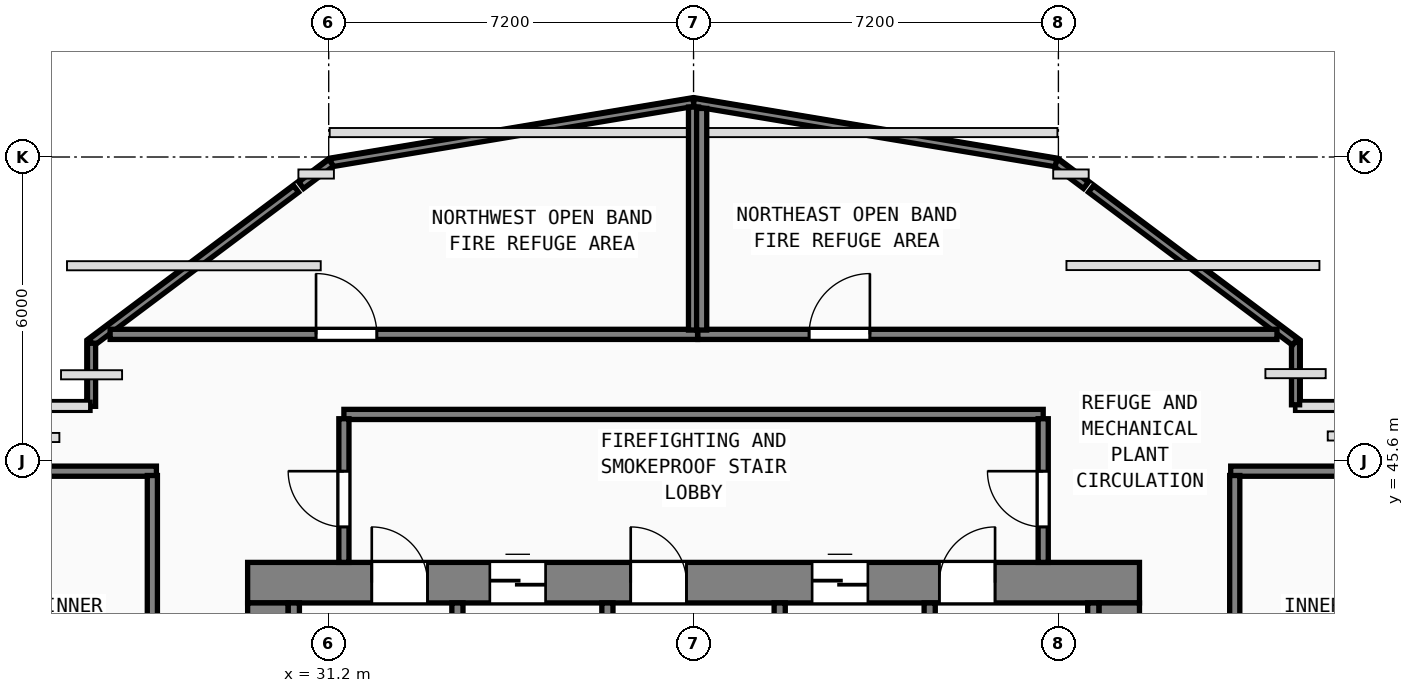
"""IFC4 building model, lengths in metres.
Left out: names, types, materials, properties, quantities, classifications, styles, units other than length and angle.
Written with IfcOpenShell. Run it as: python <this file> out.ifc"""

import sys

from ifc_helpers import new_model, si_unit, direction, frame, frame_2d, origin, origin_2d, place, context, subcontext, project, spatial, rectangle, hollow_rectangle, extrude, element, fill, save


model = new_model("IFC4")
c1 = context("Model", 3, precision=1e-05, world=origin(), true_north=direction((0.0, 1.0)))
c2 = subcontext(c1, "Body", "Model", "MODEL_VIEW")
j1 = project(units=[si_unit("LENGTHUNIT", "METRE"), si_unit("PLANEANGLEUNIT", "RADIAN")], contexts=[c1])
p1 = place(None, origin())
s1 = spatial("IfcSite", under=j1, at=p1, CompositionType="ELEMENT")
p2 = place(p1, origin())
s2 = spatial("IfcBuilding", under=s1, at=p2, CompositionType="ELEMENT")
p3 = place(p2, frame((0.0, 0.0, 43.0)))
s3 = spatial("IfcBuildingStorey", under=s2, at=p3, CompositionType="ELEMENT", Elevation=43.0)
p4 = place(p3, frame((29.6, 43.2, 0.0), z_axis=(0.0, 0.0, 1.0), x_axis=(1.0, 0.0, 0.0)))
e1 = element("IfcWall", 1, at=p4, inside=s3, PredefinedType="SHEAR", context=c2, shape_type="SweptSolid", body=[
    extrude(rectangle(XDim=17.6, YDim=0.8, at=frame_2d((8.8, 0.0))), origin(), (0.0, 0.0, 1.0), 4.4),
])
p5 = place(p4, frame((2.45, 0.0, 0.0)))
e2 = element("IfcOpeningElement", 2, at=p5, cuts=e1, PredefinedType="OPENING", context=c2, shape_type="SweptSolid", body=[
    extrude(rectangle(XDim=1.1, YDim=2.15, at=frame_2d((0.55, 1.075))), frame((0.0, 0.41, 0.0), z_axis=(0.0, -1.0, 0.0), x_axis=(1.0, 0.0, 0.0)), (0.0, 0.0, 1.0), 0.82),
])
p6 = place(p4, frame((7.56, 0.0, 0.0)))
e3 = element("IfcOpeningElement", 3, at=p6, cuts=e1, PredefinedType="OPENING", context=c2, shape_type="SweptSolid", body=[
    extrude(rectangle(XDim=1.1, YDim=2.15, at=frame_2d((0.55, 1.075))), frame((0.0, 0.41, 0.0), z_axis=(0.0, -1.0, 0.0), x_axis=(1.0, 0.0, 0.0)), (0.0, 0.0, 1.0), 0.82),
])
p7 = place(p4, frame((13.65, 0.0, 0.0)))
e4 = element("IfcOpeningElement", 4, at=p7, cuts=e1, PredefinedType="OPENING", context=c2, shape_type="SweptSolid", body=[
    extrude(rectangle(XDim=1.1, YDim=2.15, at=frame_2d((0.55, 1.075))), frame((0.0, 0.41, 0.0), z_axis=(0.0, -1.0, 0.0), x_axis=(1.0, 0.0, 0.0)), (0.0, 0.0, 1.0), 0.82),
])
p8 = place(p4, frame((4.78, 0.0, 0.0)))
e5 = element("IfcOpeningElement", 5, at=p8, cuts=e1, PredefinedType="OPENING", context=c2, shape_type="SweptSolid", body=[
    extrude(rectangle(XDim=1.1, YDim=2.2, at=frame_2d((0.55, 1.1))), frame((0.0, 0.41, 0.0), z_axis=(0.0, -1.0, 0.0), x_axis=(1.0, 0.0, 0.0)), (0.0, 0.0, 1.0), 0.82),
])
p9 = place(p4, frame((11.14, 0.0, 0.0)))
e6 = element("IfcOpeningElement", 6, at=p9, cuts=e1, PredefinedType="OPENING", context=c2, shape_type="SweptSolid", body=[
    extrude(rectangle(XDim=1.1, YDim=2.2, at=frame_2d((0.55, 1.1))), frame((0.0, 0.41, 0.0), z_axis=(0.0, -1.0, 0.0), x_axis=(1.0, 0.0, 0.0)), (0.0, 0.0, 1.0), 0.82),
])
for number, where, z_axis, x_axis in (
    (7, (30.0, 32.8, 0.0), (0.0, 0.0, 1.0), (0.0, 1.0, 0.0)),
    (8, (46.8, 32.8, 0.0), (0.0, 0.0, 1.0), (0.0, 1.0, 0.0)),
):
    element("IfcWall", number, at=place(p3, frame(where, z_axis=z_axis, x_axis=x_axis)), inside=s3, PredefinedType="SHEAR", context=c2, shape_type="SweptSolid", body=[
        extrude(rectangle(XDim=10.0, YDim=0.8, at=frame_2d((5.0, 0.0))), origin(), (0.0, 0.0, 1.0), 4.4),
    ])
for number, where, z_axis, x_axis in (
    (9, (30.512, 35.39, 0.0), (0.0, 0.0, 1.0), (0.0, 1.0, 0.0)),
    (10, (33.74, 35.39, 0.0), (0.0, 0.0, 1.0), (0.0, 1.0, 0.0)),
    (11, (36.7, 35.39, 0.0), (0.0, 0.0, 1.0), (0.0, 1.0, 0.0)),
    (12, (40.1, 35.39, 0.0), (0.0, 0.0, 1.0), (0.0, 1.0, 0.0)),
    (13, (43.06, 35.39, 0.0), (0.0, 0.0, 1.0), (0.0, 1.0, 0.0)),
    (14, (46.288, 35.39, 0.0), (0.0, 0.0, 1.0), (0.0, 1.0, 0.0)),
):
    element("IfcWall", number, at=place(p3, frame(where, z_axis=z_axis, x_axis=x_axis)), inside=s3, PredefinedType="SHEAR", context=c2, shape_type="SweptSolid", body=[
        extrude(rectangle(XDim=7.41, YDim=0.22, at=frame_2d((3.705, 0.0))), origin(), (0.0, 0.0, 1.0), 4.4),
    ])
for number, where, z_axis, x_axis in (
    (15, (31.2, 50.4, 0.0), (0.0, 0.0, 1.0), (1.0, 0.0, 0.0)),
    (16, (45.6, 50.4, 0.0), (0.0, 0.0, 1.0), (1.0, 0.0, 0.0)),
):
    element("IfcColumn", number, at=place(p3, frame(where, z_axis=z_axis, x_axis=x_axis)), inside=s3, PredefinedType="COLUMN", context=c2, shape_type="SweptSolid", body=[
        extrude(hollow_rectangle(XDim=1.3, YDim=1.3, WallThickness=0.048, at=origin_2d()), origin(), (0.0, 0.0, 1.0), 4.6),
    ])
p10 = place(p3, frame((38.4, 50.4, 0.0), z_axis=(0.0, 0.0, 1.0), x_axis=(1.0, 0.0, 0.0)))
e17 = element("IfcColumn", 17, at=p10, inside=s3, PredefinedType="COLUMN", context=c2, shape_type="SweptSolid", body=[
    extrude(hollow_rectangle(XDim=1.0, YDim=1.0, WallThickness=0.038, at=origin_2d()), origin(), (0.0, 0.0, 1.0), 4.6),
])
p11 = place(p3, frame((51.45, 46.68, 0.0), z_axis=(0.0, 0.0, 1.0), x_axis=(-1.0, 0.0, 0.0)))
e18 = element("IfcWall", 18, at=p11, inside=s3, PredefinedType="PARAPET", context=c2, shape_type="SweptSolid", body=[
    extrude(rectangle(XDim=1.17, YDim=0.16, at=frame_2d((0.585, 0.0))), origin(), (0.0, 0.0, 1.0), 1.15),
])
p12 = place(p3, frame((50.28, 46.71, 0.0), z_axis=(0.0, 0.0, 1.0), x_axis=(0.0, 1.0, 0.0)))
e19 = element("IfcWall", 19, at=p12, inside=s3, PredefinedType="PARAPET", context=c2, shape_type="SweptSolid", body=[
    extrude(rectangle(XDim=1.23, YDim=0.16, at=frame_2d((0.615, 0.0))), origin(), (0.0, 0.0, 1.0), 1.15),
])
p13 = place(p3, frame((50.268, 47.949, 0.0), z_axis=(0.0, 0.0, 1.0), x_axis=(-0.800005821362, 0.599992238106, 0.0)))
e20 = element("IfcWall", 20, at=p13, inside=s3, PredefinedType="PARAPET", context=c2, shape_type="SweptSolid", body=[
    extrude(rectangle(XDim=5.033, YDim=0.16, at=frame_2d((2.516, 0.0))), origin(), (0.0, 0.0, 1.0), 1.15),
])
p14 = place(p3, frame((46.144, 51.042, 0.0), z_axis=(0.0, 0.0, 1.0), x_axis=(-0.79992085825, 0.600105507838, 0.0)))
e21 = element("IfcWall", 21, at=p14, inside=s3, PredefinedType="PARAPET", context=c2, shape_type="SweptSolid", body=[
    extrude(rectangle(XDim=0.74, YDim=0.16, at=frame_2d((0.37, 0.0))), origin(), (0.0, 0.0, 1.0), 1.15),
])
p15 = place(p3, frame((45.552, 51.486, 0.0), z_axis=(0.0, 0.0, 1.0), x_axis=(-0.986394833909, 0.164393526752, 0.0)))
e22 = element("IfcWall", 22, at=p15, inside=s3, PredefinedType="PARAPET", context=c2, shape_type="SweptSolid", body=[
    extrude(rectangle(XDim=7.25, YDim=0.16, at=frame_2d((3.625, 0.0))), origin(), (0.0, 0.0, 1.0), 1.15),
])
p16 = place(p3, frame((38.4, 52.678, 0.0), z_axis=(0.0, 0.0, 1.0), x_axis=(-0.986393923832, -0.164398987305, 0.0)))
e23 = element("IfcWall", 23, at=p16, inside=s3, PredefinedType="PARAPET", context=c2, shape_type="SweptSolid", body=[
    extrude(rectangle(XDim=7.25, YDim=0.16, at=frame_2d((3.625, 0.0))), origin(), (0.0, 0.0, 1.0), 1.15),
])
p17 = place(p3, frame((31.249, 51.486, 0.0), z_axis=(0.0, 0.0, 1.0), x_axis=(-0.800039555223, -0.59994725608, 0.0)))
e24 = element("IfcWall", 24, at=p17, inside=s3, PredefinedType="PARAPET", context=c2, shape_type="SweptSolid", body=[
    extrude(rectangle(XDim=0.741, YDim=0.16, at=frame_2d((0.37, 0.0))), origin(), (0.0, 0.0, 1.0), 1.15),
])
p18 = place(p3, frame((30.558, 50.969, 0.0), z_axis=(0.0, 0.0, 1.0), x_axis=(-0.8, -0.6, 0.0)))
e25 = element("IfcWall", 25, at=p18, inside=s3, PredefinedType="PARAPET", context=c2, shape_type="SweptSolid", body=[
    extrude(rectangle(XDim=5.048, YDim=0.16, at=frame_2d((2.524, 0.0))), origin(), (0.0, 0.0, 1.0), 1.15),
])
p19 = place(p3, frame((26.52, 47.925, 0.0), z_axis=(0.0, 0.0, 1.0), x_axis=(0.0, -1.0, 0.0)))
e26 = element("IfcWall", 26, at=p19, inside=s3, PredefinedType="PARAPET", context=c2, shape_type="SweptSolid", body=[
    extrude(rectangle(XDim=1.245, YDim=0.16, at=frame_2d((0.623, 0.0))), origin(), (0.0, 0.0, 1.0), 1.15),
])
p20 = place(p3, frame((26.49, 46.68, 0.0), z_axis=(0.0, 0.0, 1.0), x_axis=(-1.0, 0.0, 0.0)))
e27 = element("IfcWall", 27, at=p20, inside=s3, PredefinedType="PARAPET", context=c2, shape_type="SweptSolid", body=[
    extrude(rectangle(XDim=1.17, YDim=0.16, at=frame_2d((0.585, 0.0))), origin(), (0.0, 0.0, 1.0), 1.15),
])
p21 = place(p3, frame((31.5, 46.52, 0.0), z_axis=(0.0, 0.0, 1.0), x_axis=(1.0, 0.0, 0.0)))
e28 = element("IfcWall", 28, at=p21, inside=s3, PredefinedType="SOLIDWALL", context=c2, shape_type="SweptSolid", body=[
    extrude(rectangle(XDim=13.8, YDim=0.2, at=frame_2d((6.9, 0.0))), origin(), (0.0, 0.0, 1.0), 4.4),
])
p22 = place(p3, frame((31.5, 43.6, 0.0), z_axis=(0.0, 0.0, 1.0), x_axis=(0.0, 1.0, 0.0)))
e29 = element("IfcWall", 29, at=p22, inside=s3, PredefinedType="SOLIDWALL", context=c2, shape_type="SweptSolid", body=[
    extrude(rectangle(XDim=2.835, YDim=0.2, at=frame_2d((1.417, 0.0))), origin(), (0.0, 0.0, 1.0), 4.4),
])
p23 = place(p22, frame((1.8, 0.0, 0.0), z_axis=(0.0, 0.0, 1.0), x_axis=(-1.0, 0.0, 0.0)))
e30 = element("IfcOpeningElement", 30, at=p23, cuts=e29, PredefinedType="OPENING", context=c2, shape_type="SweptSolid", body=[
    extrude(rectangle(XDim=1.1, YDim=2.15, at=frame_2d((0.55, 1.075))), frame((0.0, 0.11, 0.0), z_axis=(0.0, -1.0, 0.0), x_axis=(1.0, 0.0, 0.0)), (0.0, 0.0, 1.0), 0.22),
])
p24 = place(p3, frame((45.3, 43.6, 0.0), z_axis=(0.0, 0.0, 1.0), x_axis=(0.0, 1.0, 0.0)))
e31 = element("IfcWall", 31, at=p24, inside=s3, PredefinedType="SOLIDWALL", context=c2, shape_type="SweptSolid", body=[
    extrude(rectangle(XDim=2.835, YDim=0.2, at=frame_2d((1.417, 0.0))), origin(), (0.0, 0.0, 1.0), 4.4),
])
p25 = place(p24, frame((0.7, 0.0, 0.0)))
e32 = element("IfcOpeningElement", 32, at=p25, cuts=e31, PredefinedType="OPENING", context=c2, shape_type="SweptSolid", body=[
    extrude(rectangle(XDim=1.1, YDim=2.15, at=frame_2d((0.55, 1.075))), frame((0.0, 0.11, 0.0), z_axis=(0.0, -1.0, 0.0), x_axis=(1.0, 0.0, 0.0)), (0.0, 0.0, 1.0), 0.22),
])
p26 = place(p3, frame((25.412, 45.4, 0.0), z_axis=(0.0, 0.0, 1.0), x_axis=(1.0, 0.0, 0.0)))
e33 = element("IfcWall", 33, at=p26, inside=s3, PredefinedType="SOLIDWALL", context=c2, shape_type="SweptSolid", body=[
    extrude(rectangle(XDim=2.388, YDim=0.2, at=frame_2d((1.194, 0.0))), origin(), (0.0, 0.0, 1.0), 4.4),
])
p27 = place(p3, frame((27.72, 38.845, 0.0), z_axis=(0.0, 0.0, 1.0), x_axis=(0.0, 1.0, 0.0)))
e34 = element("IfcWall", 34, at=p27, inside=s3, PredefinedType="SOLIDWALL", context=c2, shape_type="SweptSolid", body=[
    extrude(rectangle(XDim=6.47, YDim=0.2, at=frame_2d((3.235, 0.0))), origin(), (0.0, 0.0, 1.0), 4.4),
])
p28 = place(p27, frame((3.135, 0.0, 0.0), z_axis=(0.0, 0.0, 1.0), x_axis=(-1.0, 0.0, 0.0)))
e35 = element("IfcOpeningElement", 35, at=p28, cuts=e34, PredefinedType="OPENING", context=c2, shape_type="SweptSolid", body=[
    extrude(rectangle(XDim=1.1, YDim=2.15, at=frame_2d((0.55, 1.075))), frame((0.0, 0.11, 0.0), z_axis=(0.0, -1.0, 0.0), x_axis=(1.0, 0.0, 0.0)), (0.0, 0.0, 1.0), 0.22),
])
p29 = place(p3, frame((49.0, 45.4, 0.0), z_axis=(0.0, 0.0, 1.0), x_axis=(1.0, 0.0, 0.0)))
e36 = element("IfcWall", 36, at=p29, inside=s3, PredefinedType="SOLIDWALL", context=c2, shape_type="SweptSolid", body=[
    extrude(rectangle(XDim=2.388, YDim=0.2, at=frame_2d((1.194, 0.0))), origin(), (0.0, 0.0, 1.0), 4.4),
])
p30 = place(p3, frame((49.08, 38.845, 0.0), z_axis=(0.0, 0.0, 1.0), x_axis=(0.0, 1.0, 0.0)))
e37 = element("IfcWall", 37, at=p30, inside=s3, PredefinedType="SOLIDWALL", context=c2, shape_type="SweptSolid", body=[
    extrude(rectangle(XDim=6.47, YDim=0.2, at=frame_2d((3.235, 0.0))), origin(), (0.0, 0.0, 1.0), 4.4),
])
p31 = place(p30, frame((2.035, 0.0, 0.0)))
e38 = element("IfcOpeningElement", 38, at=p31, cuts=e37, PredefinedType="OPENING", context=c2, shape_type="SweptSolid", body=[
    extrude(rectangle(XDim=1.1, YDim=2.15, at=frame_2d((0.55, 1.075))), frame((0.0, 0.11, 0.0), z_axis=(0.0, -1.0, 0.0), x_axis=(1.0, 0.0, 0.0)), (0.0, 0.0, 1.0), 0.22),
])
p32 = place(p3, frame((26.887, 48.1, 0.0), z_axis=(0.0, 0.0, 1.0), x_axis=(1.0, 0.0, 0.0)))
e39 = element("IfcWall", 39, at=p32, inside=s3, PredefinedType="SOLIDWALL", context=c2, shape_type="SweptSolid", body=[
    extrude(rectangle(XDim=11.593, YDim=0.2, at=frame_2d((5.797, 0.0))), origin(), (0.0, 0.0, 1.0), 4.4),
])
p33 = place(p32, frame((4.063, 0.0, 0.0)))
e40 = element("IfcOpeningElement", 40, at=p33, cuts=e39, PredefinedType="OPENING", context=c2, shape_type="SweptSolid", body=[
    extrude(rectangle(XDim=1.2, YDim=2.15, at=frame_2d((0.6, 1.075))), frame((0.0, 0.11, 0.0), z_axis=(0.0, -1.0, 0.0), x_axis=(1.0, 0.0, 0.0)), (0.0, 0.0, 1.0), 0.22),
])
p34 = place(p3, frame((38.4, 48.185, 0.0), z_axis=(0.0, 0.0, 1.0), x_axis=(0.0, 1.0, 0.0)))
e41 = element("IfcWall", 41, at=p34, inside=s3, PredefinedType="SOLIDWALL", context=c2, shape_type="SweptSolid", body=[
    extrude(rectangle(XDim=4.4, YDim=0.2, at=frame_2d((2.2, 0.0))), origin(), (0.0, 0.0, 1.0), 4.4),
])
p35 = place(p3, frame((38.485, 48.1, 0.0), z_axis=(0.0, 0.0, 1.0), x_axis=(1.0, 0.0, 0.0)))
e42 = element("IfcWall", 42, at=p35, inside=s3, PredefinedType="SOLIDWALL", context=c2, shape_type="SweptSolid", body=[
    extrude(rectangle(XDim=11.428, YDim=0.2, at=frame_2d((5.714, 0.0))), origin(), (0.0, 0.0, 1.0), 4.4),
])
p36 = place(p35, frame((2.195, 0.0, 0.0)))
e43 = element("IfcOpeningElement", 43, at=p36, cuts=e42, PredefinedType="OPENING", context=c2, shape_type="SweptSolid", body=[
    extrude(rectangle(XDim=1.2, YDim=2.15, at=frame_2d((0.6, 1.075))), frame((0.0, 0.11, 0.0), z_axis=(0.0, -1.0, 0.0), x_axis=(1.0, 0.0, 0.0)), (0.0, 0.0, 1.0), 0.22),
])
p37 = place(p3, frame((38.56, 48.185, 0.0), z_axis=(0.0, 0.0, 1.0), x_axis=(0.0, 1.0, 0.0)))
e44 = element("IfcWall", 44, at=p37, inside=s3, PredefinedType="SOLIDWALL", context=c2, shape_type="SweptSolid", body=[
    extrude(rectangle(XDim=4.373, YDim=0.2, at=frame_2d((2.187, 0.0))), origin(), (0.0, 0.0, 1.0), 4.4),
])
p38 = place(p5, origin())
e45 = element("IfcDoor", 45, at=p38, inside=s3, OperationType="SINGLE_SWING_LEFT", PredefinedType="DOOR", context=c2, shape_type="SweptSolid", body=[
    extrude(rectangle(XDim=1.1, YDim=2.15, at=frame_2d((0.55, 1.075))), frame((0.0, 0.185, 0.0), z_axis=(0.0, -1.0, 0.0), x_axis=(1.0, 0.0, 0.0)), (0.0, 0.0, 1.0), 0.05),
])
fill(e2, e45)
p39 = place(p6, origin())
e46 = element("IfcDoor", 46, at=p39, inside=s3, OperationType="SINGLE_SWING_LEFT", PredefinedType="DOOR", context=c2, shape_type="SweptSolid", body=[
    extrude(rectangle(XDim=1.1, YDim=2.15, at=frame_2d((0.55, 1.075))), frame((0.0, 0.185, 0.0), z_axis=(0.0, -1.0, 0.0), x_axis=(1.0, 0.0, 0.0)), (0.0, 0.0, 1.0), 0.05),
])
fill(e3, e46)
p40 = place(p7, origin())
e47 = element("IfcDoor", 47, at=p40, inside=s3, OperationType="SINGLE_SWING_RIGHT", PredefinedType="DOOR", context=c2, shape_type="SweptSolid", body=[
    extrude(rectangle(XDim=1.1, YDim=2.15, at=frame_2d((0.55, 1.075))), frame((0.0, 0.185, 0.0), z_axis=(0.0, -1.0, 0.0), x_axis=(1.0, 0.0, 0.0)), (0.0, 0.0, 1.0), 0.05),
])
fill(e4, e47)
p41 = place(p23, origin())
e48 = element("IfcDoor", 48, at=p41, inside=s3, OperationType="SINGLE_SWING_LEFT", PredefinedType="DOOR", context=c2, shape_type="SweptSolid", body=[
    extrude(rectangle(XDim=1.1, YDim=2.15, at=frame_2d((0.55, 1.075))), frame((0.0, 0.025, 0.0), z_axis=(0.0, -1.0, 0.0), x_axis=(1.0, 0.0, 0.0)), (0.0, 0.0, 1.0), 0.05),
])
fill(e30, e48)
p42 = place(p25, origin())
e49 = element("IfcDoor", 49, at=p42, inside=s3, OperationType="SINGLE_SWING_RIGHT", PredefinedType="DOOR", context=c2, shape_type="SweptSolid", body=[
    extrude(rectangle(XDim=1.1, YDim=2.15, at=frame_2d((0.55, 1.075))), frame((0.0, 0.025, 0.0), z_axis=(0.0, -1.0, 0.0), x_axis=(1.0, 0.0, 0.0)), (0.0, 0.0, 1.0), 0.05),
])
fill(e32, e49)
p43 = place(p8, origin())
e50 = element("IfcDoor", 50, at=p43, inside=s3, OperationType="SLIDING_TO_LEFT", PredefinedType="DOOR", context=c2, shape_type="SweptSolid", body=[
    extrude(rectangle(XDim=1.1, YDim=2.2, at=frame_2d((0.55, 1.1))), frame((0.0, 0.185, 0.0), z_axis=(0.0, -1.0, 0.0), x_axis=(1.0, 0.0, 0.0)), (0.0, 0.0, 1.0), 0.05),
])
fill(e5, e50)
p44 = place(p9, origin())
e51 = element("IfcDoor", 51, at=p44, inside=s3, OperationType="SLIDING_TO_LEFT", PredefinedType="DOOR", context=c2, shape_type="SweptSolid", body=[
    extrude(rectangle(XDim=1.1, YDim=2.2, at=frame_2d((0.55, 1.1))), frame((0.0, 0.185, 0.0), z_axis=(0.0, -1.0, 0.0), x_axis=(1.0, 0.0, 0.0)), (0.0, 0.0, 1.0), 0.05),
])
fill(e6, e51)
p45 = place(p33, origin())
e52 = element("IfcDoor", 52, at=p45, inside=s3, OperationType="SINGLE_SWING_LEFT", PredefinedType="DOOR", context=c2, shape_type="SweptSolid", body=[
    extrude(rectangle(XDim=1.2, YDim=2.15, at=frame_2d((0.6, 1.075))), frame((0.0, 0.025, 0.0), z_axis=(0.0, -1.0, 0.0), x_axis=(1.0, 0.0, 0.0)), (0.0, 0.0, 1.0), 0.05),
])
fill(e40, e52)
p46 = place(p36, origin())
e53 = element("IfcDoor", 53, at=p46, inside=s3, OperationType="SINGLE_SWING_RIGHT", PredefinedType="DOOR", context=c2, shape_type="SweptSolid", body=[
    extrude(rectangle(XDim=1.2, YDim=2.15, at=frame_2d((0.6, 1.075))), frame((0.0, 0.025, 0.0), z_axis=(0.0, -1.0, 0.0), x_axis=(1.0, 0.0, 0.0)), (0.0, 0.0, 1.0), 0.05),
])
fill(e43, e53)
save(model, sys.argv[1])
